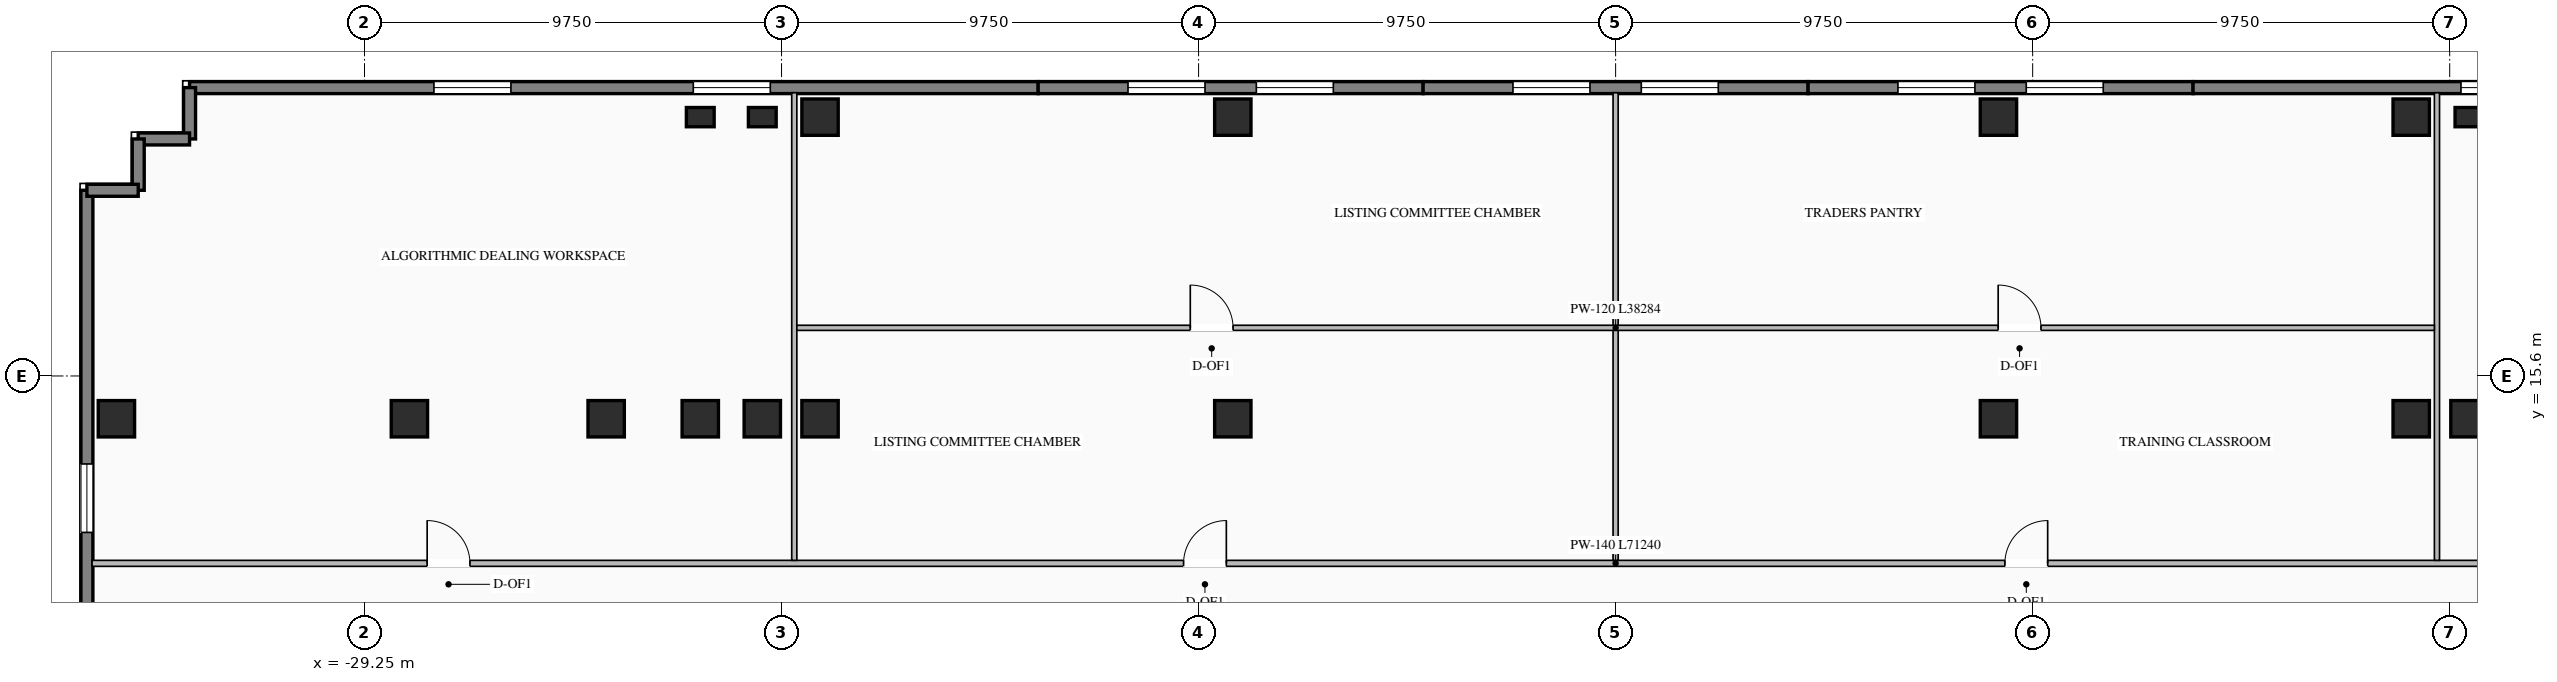
"""IFC4 building model, lengths in metres.
Left out: names, types, materials, properties, quantities, classifications, styles, units other than length and angle.
Written with IfcOpenShell. Run it as: python <this file> out.ifc"""

import sys

from ifc_helpers import new_model, si_unit, direction, frame, frame_2d, origin, origin_2d, place, context, subcontext, project, spatial, rectangle, i_section, extrude, element, fill, save


model = new_model("IFC4")
c1 = context("Model", 3, precision=1e-05, world=origin(), true_north=direction((0.0, 1.0)))
c2 = subcontext(c1, "Body", "Model", "MODEL_VIEW")
j1 = project(units=[si_unit("LENGTHUNIT", "METRE"), si_unit("PLANEANGLEUNIT", "RADIAN")], contexts=[c1])
p1 = place(None, origin())
s1 = spatial("IfcSite", under=j1, at=p1, CompositionType="ELEMENT")
p2 = place(p1, origin())
s2 = spatial("IfcBuilding", under=s1, at=p2, CompositionType="ELEMENT")
p3 = place(p2, frame((0.0, 0.0, 51.9)))
s3 = spatial("IfcBuildingStorey", under=s2, at=p3, CompositionType="ELEMENT", Elevation=51.9)
for number, where, z_axis, x_axis in (
    (1, (-21.4, 14.6, 0.0), (0.0, 0.0, 1.0), (1.0, 0.0, 0.0)),
    (2, (-19.95, 14.6, 0.0), (0.0, 0.0, 1.0), (1.0, 0.0, 0.0)),
    (3, (-18.6, 14.6, 0.0), (0.0, 0.0, 1.0), (1.0, 0.0, 0.0)),
    (4, (-8.95, 14.6, 0.0), (0.0, 0.0, 1.0), (1.0, 0.0, 0.0)),
    (5, (8.95, 14.6, 0.0), (0.0, 0.0, 1.0), (1.0, 0.0, 0.0)),
    (6, (18.6, 14.6, 0.0), (0.0, 0.0, 1.0), (1.0, 0.0, 0.0)),
    (7, (19.95, 14.6, 0.0), (0.0, 0.0, 1.0), (1.0, 0.0, 0.0)),
    (8, (-23.6, 14.6, 0.0), (0.0, 0.0, 1.0), (1.0, 0.0, 0.0)),
    (9, (-28.2, 14.6, 0.0), (0.0, 0.0, 1.0), (1.0, 0.0, 0.0)),
    (10, (-18.6, 21.65, 0.0), (0.0, 0.0, 1.0), (1.0, 0.0, 0.0)),
    (11, (-8.95, 21.65, 0.0), (0.0, 0.0, 1.0), (1.0, 0.0, 0.0)),
    (12, (8.95, 21.65, 0.0), (0.0, 0.0, 1.0), (1.0, 0.0, 0.0)),
    (13, (18.6, 21.65, 0.0), (0.0, 0.0, 1.0), (1.0, 0.0, 0.0)),
    (14, (-35.05, 14.6, 0.0), (0.0, 0.0, 1.0), (1.0, 0.0, 0.0)),
):
    element("IfcColumn", number, at=place(p3, frame(where, z_axis=z_axis, x_axis=x_axis)), inside=s3, PredefinedType="COLUMN", context=c2, shape_type="SweptSolid", body=[
        extrude(i_section(OverallWidth=0.85, OverallDepth=0.85, WebThickness=0.032, FlangeThickness=0.048, at=origin_2d()), origin(), (0.0, 0.0, 1.0), 3.45),
    ])
for number, where, z_axis, x_axis in (
    (15, (-21.4, 21.65, 0.0), (0.0, 0.0, 1.0), (1.0, 0.0, 0.0)),
    (16, (-19.95, 21.65, 0.0), (0.0, 0.0, 1.0), (1.0, 0.0, 0.0)),
    (17, (19.95, 21.65, 0.0), (0.0, 0.0, 1.0), (1.0, 0.0, 0.0)),
):
    element("IfcColumn", number, at=place(p3, frame(where, z_axis=z_axis, x_axis=x_axis)), inside=s3, PredefinedType="PILASTER", context=c2, shape_type="SweptSolid", body=[
        extrude(rectangle(XDim=0.65, YDim=0.45, at=origin_2d()), origin(), (0.0, 0.0, 1.0), 3.45),
    ])
p4 = place(p3, frame((-33.34, 22.34, 0.0), z_axis=(0.0, 0.0, 1.0), x_axis=(1.0, 0.0, 0.0)))
e18 = element("IfcWall", 18, at=p4, inside=s3, PredefinedType="STANDARD", context=c2, shape_type="SweptSolid", body=[
    extrude(rectangle(XDim=19.84, YDim=0.28, at=frame_2d((9.92, 0.0))), origin(), (0.0, 0.0, 1.0), 3.25),
])
p5 = place(p4, frame((5.713, 0.0, 0.76)))
e19 = element("IfcOpeningElement", 19, at=p5, cuts=e18, PredefinedType="OPENING", context=c2, shape_type="SweptSolid", body=[
    extrude(rectangle(XDim=1.8, YDim=1.95, at=frame_2d((0.9, 0.975))), frame((0.0, 0.15, 0.0), z_axis=(0.0, -1.0, 0.0), x_axis=(1.0, 0.0, 0.0)), (0.0, 0.0, 1.0), 0.3),
])
p6 = place(p4, frame((11.777, 0.0, 0.76)))
e20 = element("IfcOpeningElement", 20, at=p6, cuts=e18, PredefinedType="OPENING", context=c2, shape_type="SweptSolid", body=[
    extrude(rectangle(XDim=1.8, YDim=1.95, at=frame_2d((0.9, 0.975))), frame((0.0, 0.15, 0.0), z_axis=(0.0, -1.0, 0.0), x_axis=(1.0, 0.0, 0.0)), (0.0, 0.0, 1.0), 0.3),
])
p7 = place(p3, frame((-13.5, 22.34, 0.0), z_axis=(0.0, 0.0, 1.0), x_axis=(1.0, 0.0, 0.0)))
e21 = element("IfcWall", 21, at=p7, inside=s3, PredefinedType="STANDARD", context=c2, shape_type="SweptSolid", body=[
    extrude(rectangle(XDim=9.0, YDim=0.28, at=frame_2d((4.5, 0.0))), origin(), (0.0, 0.0, 1.0), 3.25),
])
p8 = place(p7, frame((2.1, 0.0, 0.76)))
e22 = element("IfcOpeningElement", 22, at=p8, cuts=e21, PredefinedType="OPENING", context=c2, shape_type="SweptSolid", body=[
    extrude(rectangle(XDim=1.8, YDim=1.95, at=frame_2d((0.9, 0.975))), frame((0.0, 0.15, 0.0), z_axis=(0.0, -1.0, 0.0), x_axis=(1.0, 0.0, 0.0)), (0.0, 0.0, 1.0), 0.3),
])
p9 = place(p7, frame((5.1, 0.0, 0.76)))
e23 = element("IfcOpeningElement", 23, at=p9, cuts=e21, PredefinedType="OPENING", context=c2, shape_type="SweptSolid", body=[
    extrude(rectangle(XDim=1.8, YDim=1.95, at=frame_2d((0.9, 0.975))), frame((0.0, 0.15, 0.0), z_axis=(0.0, -1.0, 0.0), x_axis=(1.0, 0.0, 0.0)), (0.0, 0.0, 1.0), 0.3),
])
p10 = place(p3, frame((-4.5, 22.34, 0.0), z_axis=(0.0, 0.0, 1.0), x_axis=(1.0, 0.0, 0.0)))
e24 = element("IfcWall", 24, at=p10, inside=s3, PredefinedType="STANDARD", context=c2, shape_type="SweptSolid", body=[
    extrude(rectangle(XDim=9.0, YDim=0.28, at=frame_2d((4.5, 0.0))), origin(), (0.0, 0.0, 1.0), 3.25),
])
p11 = place(p10, frame((2.1, 0.0, 0.76)))
e25 = element("IfcOpeningElement", 25, at=p11, cuts=e24, PredefinedType="OPENING", context=c2, shape_type="SweptSolid", body=[
    extrude(rectangle(XDim=1.8, YDim=1.95, at=frame_2d((0.9, 0.975))), frame((0.0, 0.15, 0.0), z_axis=(0.0, -1.0, 0.0), x_axis=(1.0, 0.0, 0.0)), (0.0, 0.0, 1.0), 0.3),
])
p12 = place(p10, frame((5.1, 0.0, 0.76)))
e26 = element("IfcOpeningElement", 26, at=p12, cuts=e24, PredefinedType="OPENING", context=c2, shape_type="SweptSolid", body=[
    extrude(rectangle(XDim=1.8, YDim=1.95, at=frame_2d((0.9, 0.975))), frame((0.0, 0.15, 0.0), z_axis=(0.0, -1.0, 0.0), x_axis=(1.0, 0.0, 0.0)), (0.0, 0.0, 1.0), 0.3),
])
p13 = place(p3, frame((4.5, 22.34, 0.0), z_axis=(0.0, 0.0, 1.0), x_axis=(1.0, 0.0, 0.0)))
e27 = element("IfcWall", 27, at=p13, inside=s3, PredefinedType="STANDARD", context=c2, shape_type="SweptSolid", body=[
    extrude(rectangle(XDim=9.0, YDim=0.28, at=frame_2d((4.5, 0.0))), origin(), (0.0, 0.0, 1.0), 3.25),
])
p14 = place(p13, frame((2.1, 0.0, 0.76)))
e28 = element("IfcOpeningElement", 28, at=p14, cuts=e27, PredefinedType="OPENING", context=c2, shape_type="SweptSolid", body=[
    extrude(rectangle(XDim=1.8, YDim=1.95, at=frame_2d((0.9, 0.975))), frame((0.0, 0.15, 0.0), z_axis=(0.0, -1.0, 0.0), x_axis=(1.0, 0.0, 0.0)), (0.0, 0.0, 1.0), 0.3),
])
p15 = place(p13, frame((5.1, 0.0, 0.76)))
e29 = element("IfcOpeningElement", 29, at=p15, cuts=e27, PredefinedType="OPENING", context=c2, shape_type="SweptSolid", body=[
    extrude(rectangle(XDim=1.8, YDim=1.95, at=frame_2d((0.9, 0.975))), frame((0.0, 0.15, 0.0), z_axis=(0.0, -1.0, 0.0), x_axis=(1.0, 0.0, 0.0)), (0.0, 0.0, 1.0), 0.3),
])
p16 = place(p3, frame((13.5, 22.34, 0.0), z_axis=(0.0, 0.0, 1.0), x_axis=(1.0, 0.0, 0.0)))
e30 = element("IfcWall", 30, at=p16, inside=s3, PredefinedType="STANDARD", context=c2, shape_type="SweptSolid", body=[
    extrude(rectangle(XDim=19.84, YDim=0.28, at=frame_2d((9.92, 0.0))), origin(), (0.0, 0.0, 1.0), 3.25),
])
p17 = place(p16, frame((6.263, 0.0, 0.76)))
e31 = element("IfcOpeningElement", 31, at=p17, cuts=e30, PredefinedType="OPENING", context=c2, shape_type="SweptSolid", body=[
    extrude(rectangle(XDim=1.8, YDim=1.95, at=frame_2d((0.9, 0.975))), frame((0.0, 0.15, 0.0), z_axis=(0.0, -1.0, 0.0), x_axis=(1.0, 0.0, 0.0)), (0.0, 0.0, 1.0), 0.3),
])
p18 = place(p16, frame((12.327, 0.0, 0.76)))
e32 = element("IfcOpeningElement", 32, at=p18, cuts=e30, PredefinedType="OPENING", context=c2, shape_type="SweptSolid", body=[
    extrude(rectangle(XDim=1.8, YDim=1.95, at=frame_2d((0.9, 0.975))), frame((0.0, 0.15, 0.0), z_axis=(0.0, -1.0, 0.0), x_axis=(1.0, 0.0, 0.0)), (0.0, 0.0, 1.0), 0.3),
])
p19 = place(p3, frame((-35.74, 0.0, 0.0), z_axis=(0.0, 0.0, 1.0), x_axis=(0.0, 1.0, 0.0)))
e33 = element("IfcWall", 33, at=p19, inside=s3, PredefinedType="STANDARD", context=c2, shape_type="SweptSolid", body=[
    extrude(rectangle(XDim=19.94, YDim=0.28, at=frame_2d((9.97, 0.0))), origin(), (0.0, 0.0, 1.0), 3.25),
])
p20 = place(p19, frame((5.847, 0.0, 0.76)))
e34 = element("IfcOpeningElement", 34, at=p20, cuts=e33, PredefinedType="OPENING", context=c2, shape_type="SweptSolid", body=[
    extrude(rectangle(XDim=1.6, YDim=1.95, at=frame_2d((0.8, 0.975))), frame((0.0, 0.15, 0.0), z_axis=(0.0, -1.0, 0.0), x_axis=(1.0, 0.0, 0.0)), (0.0, 0.0, 1.0), 0.3),
])
p21 = place(p19, frame((11.943, 0.0, 0.76)))
e35 = element("IfcOpeningElement", 35, at=p21, cuts=e33, PredefinedType="OPENING", context=c2, shape_type="SweptSolid", body=[
    extrude(rectangle(XDim=1.6, YDim=1.95, at=frame_2d((0.8, 0.975))), frame((0.0, 0.15, 0.0), z_axis=(0.0, -1.0, 0.0), x_axis=(1.0, 0.0, 0.0)), (0.0, 0.0, 1.0), 0.3),
])
p22 = place(p3, frame((-33.34, 22.34, 0.0), z_axis=(0.0, 0.0, 1.0), x_axis=(0.0, -1.0, 0.0)))
e36 = element("IfcWall", 36, at=p22, inside=s3, PredefinedType="STANDARD", context=c2, shape_type="SweptSolid", body=[
    extrude(rectangle(XDim=1.2, YDim=0.28, at=frame_2d((0.6, 0.0))), origin(), (0.0, 0.0, 1.0), 3.25),
])
for number, where, z_axis, x_axis in (
    (37, (-33.34, 21.14, 0.0), (0.0, 0.0, 1.0), (-1.0, 0.0, 0.0)),
    (38, (-34.54, 21.14, 0.0), (0.0, 0.0, 1.0), (0.0, -1.0, 0.0)),
    (39, (-34.54, 19.94, 0.0), (0.0, 0.0, 1.0), (-1.0, 0.0, 0.0)),
):
    element("IfcWall", number, at=place(p3, frame(where, z_axis=z_axis, x_axis=x_axis)), inside=s3, PredefinedType="STANDARD", context=c2, shape_type="SweptSolid", body=[
        extrude(rectangle(XDim=1.2, YDim=0.28, at=frame_2d((0.6, 0.0))), origin(), (0.0, 0.0, 1.0), 3.25),
    ])
p23 = place(p3, frame((-35.62, 11.22, 0.0), z_axis=(0.0, 0.0, 1.0), x_axis=(1.0, 0.0, 0.0)))
e40 = element("IfcWall", 40, at=p23, inside=s3, PredefinedType="STANDARD", context=c2, shape_type="SweptSolid", body=[
    extrude(rectangle(XDim=71.24, YDim=0.14, at=frame_2d((35.62, 0.0))), origin(), (0.0, 0.0, 1.0), 3.25),
])
p24 = place(p23, frame((7.835, 0.0, 0.0)))
e41 = element("IfcOpeningElement", 41, at=p24, cuts=e40, PredefinedType="OPENING", context=c2, shape_type="SweptSolid", body=[
    extrude(rectangle(XDim=1.0, YDim=2.08, at=frame_2d((0.5, 1.04))), frame((0.0, 0.08, 0.0), z_axis=(0.0, -1.0, 0.0), x_axis=(1.0, 0.0, 0.0)), (0.0, 0.0, 1.0), 0.16),
])
p25 = place(p23, frame((25.519, 0.0, 0.0)))
e42 = element("IfcOpeningElement", 42, at=p25, cuts=e40, PredefinedType="OPENING", context=c2, shape_type="SweptSolid", body=[
    extrude(rectangle(XDim=1.0, YDim=2.08, at=frame_2d((0.5, 1.04))), frame((0.0, 0.08, 0.0), z_axis=(0.0, -1.0, 0.0), x_axis=(1.0, 0.0, 0.0)), (0.0, 0.0, 1.0), 0.16),
])
p26 = place(p23, frame((44.721, 0.0, 0.0)))
e43 = element("IfcOpeningElement", 43, at=p26, cuts=e40, PredefinedType="OPENING", context=c2, shape_type="SweptSolid", body=[
    extrude(rectangle(XDim=1.0, YDim=2.08, at=frame_2d((0.5, 1.04))), frame((0.0, 0.08, 0.0), z_axis=(0.0, -1.0, 0.0), x_axis=(1.0, 0.0, 0.0)), (0.0, 0.0, 1.0), 0.16),
])
p27 = place(p23, frame((62.405, 0.0, 0.0)))
e44 = element("IfcOpeningElement", 44, at=p27, cuts=e40, PredefinedType="OPENING", context=c2, shape_type="SweptSolid", body=[
    extrude(rectangle(XDim=1.0, YDim=2.08, at=frame_2d((0.5, 1.04))), frame((0.0, 0.08, 0.0), z_axis=(0.0, -1.0, 0.0), x_axis=(1.0, 0.0, 0.0)), (0.0, 0.0, 1.0), 0.16),
])
for number, where, z_axis, x_axis in (
    (45, (-19.202, 11.29, 0.0), (0.0, 0.0, 1.0), (0.0, 1.0, 0.0)),
    (46, (0.0, 11.29, 0.0), (0.0, 0.0, 1.0), (0.0, 1.0, 0.0)),
    (47, (19.202, 11.29, 0.0), (0.0, 0.0, 1.0), (0.0, 1.0, 0.0)),
):
    element("IfcWall", number, at=place(p3, frame(where, z_axis=z_axis, x_axis=x_axis)), inside=s3, PredefinedType="STANDARD", context=c2, shape_type="SweptSolid", body=[
        extrude(rectangle(XDim=10.93, YDim=0.12, at=frame_2d((5.465, 0.0))), origin(), (0.0, 0.0, 1.0), 3.25),
    ])
p28 = place(p3, frame((-19.142, 16.725, 0.0), z_axis=(0.0, 0.0, 1.0), x_axis=(1.0, 0.0, 0.0)))
e48 = element("IfcWall", 48, at=p28, inside=s3, PredefinedType="STANDARD", context=c2, shape_type="SweptSolid", body=[
    extrude(rectangle(XDim=38.284, YDim=0.12, at=frame_2d((19.142, 0.0))), origin(), (0.0, 0.0, 1.0), 3.25),
])
p29 = place(p28, frame((9.198, 0.0, 0.0)))
e49 = element("IfcOpeningElement", 49, at=p29, cuts=e48, PredefinedType="OPENING", context=c2, shape_type="SweptSolid", body=[
    extrude(rectangle(XDim=1.0, YDim=2.08, at=frame_2d((0.5, 1.04))), frame((0.0, 0.07, 0.0), z_axis=(0.0, -1.0, 0.0), x_axis=(1.0, 0.0, 0.0)), (0.0, 0.0, 1.0), 0.14),
])
p30 = place(p28, frame((28.086, 0.0, 0.0)))
e50 = element("IfcOpeningElement", 50, at=p30, cuts=e48, PredefinedType="OPENING", context=c2, shape_type="SweptSolid", body=[
    extrude(rectangle(XDim=1.0, YDim=2.08, at=frame_2d((0.5, 1.04))), frame((0.0, 0.07, 0.0), z_axis=(0.0, -1.0, 0.0), x_axis=(1.0, 0.0, 0.0)), (0.0, 0.0, 1.0), 0.14),
])
p31 = place(p5, origin())
e51 = element("IfcWindow", 51, at=p31, inside=s3, PartitioningType="SINGLE_PANEL", PredefinedType="WINDOW", context=c2, shape_type="SweptSolid", body=[
    extrude(rectangle(XDim=1.8, YDim=1.95, at=frame_2d((0.9, 0.975))), frame((0.0, 0.03, 0.0), z_axis=(0.0, -1.0, 0.0), x_axis=(1.0, 0.0, 0.0)), (0.0, 0.0, 1.0), 0.06),
])
fill(e19, e51)
p32 = place(p6, origin())
e52 = element("IfcWindow", 52, at=p32, inside=s3, PartitioningType="SINGLE_PANEL", PredefinedType="WINDOW", context=c2, shape_type="SweptSolid", body=[
    extrude(rectangle(XDim=1.8, YDim=1.95, at=frame_2d((0.9, 0.975))), frame((0.0, 0.03, 0.0), z_axis=(0.0, -1.0, 0.0), x_axis=(1.0, 0.0, 0.0)), (0.0, 0.0, 1.0), 0.06),
])
fill(e20, e52)
p33 = place(p8, origin())
e53 = element("IfcWindow", 53, at=p33, inside=s3, PartitioningType="SINGLE_PANEL", PredefinedType="WINDOW", context=c2, shape_type="SweptSolid", body=[
    extrude(rectangle(XDim=1.8, YDim=1.95, at=frame_2d((0.9, 0.975))), frame((0.0, 0.03, 0.0), z_axis=(0.0, -1.0, 0.0), x_axis=(1.0, 0.0, 0.0)), (0.0, 0.0, 1.0), 0.06),
])
fill(e22, e53)
p34 = place(p9, origin())
e54 = element("IfcWindow", 54, at=p34, inside=s3, PartitioningType="SINGLE_PANEL", PredefinedType="WINDOW", context=c2, shape_type="SweptSolid", body=[
    extrude(rectangle(XDim=1.8, YDim=1.95, at=frame_2d((0.9, 0.975))), frame((0.0, 0.03, 0.0), z_axis=(0.0, -1.0, 0.0), x_axis=(1.0, 0.0, 0.0)), (0.0, 0.0, 1.0), 0.06),
])
fill(e23, e54)
p35 = place(p11, origin())
e55 = element("IfcWindow", 55, at=p35, inside=s3, PartitioningType="SINGLE_PANEL", PredefinedType="WINDOW", context=c2, shape_type="SweptSolid", body=[
    extrude(rectangle(XDim=1.8, YDim=1.95, at=frame_2d((0.9, 0.975))), frame((0.0, 0.03, 0.0), z_axis=(0.0, -1.0, 0.0), x_axis=(1.0, 0.0, 0.0)), (0.0, 0.0, 1.0), 0.06),
])
fill(e25, e55)
p36 = place(p12, origin())
e56 = element("IfcWindow", 56, at=p36, inside=s3, PartitioningType="SINGLE_PANEL", PredefinedType="WINDOW", context=c2, shape_type="SweptSolid", body=[
    extrude(rectangle(XDim=1.8, YDim=1.95, at=frame_2d((0.9, 0.975))), frame((0.0, 0.03, 0.0), z_axis=(0.0, -1.0, 0.0), x_axis=(1.0, 0.0, 0.0)), (0.0, 0.0, 1.0), 0.06),
])
fill(e26, e56)
p37 = place(p14, origin())
e57 = element("IfcWindow", 57, at=p37, inside=s3, PartitioningType="SINGLE_PANEL", PredefinedType="WINDOW", context=c2, shape_type="SweptSolid", body=[
    extrude(rectangle(XDim=1.8, YDim=1.95, at=frame_2d((0.9, 0.975))), frame((0.0, 0.03, 0.0), z_axis=(0.0, -1.0, 0.0), x_axis=(1.0, 0.0, 0.0)), (0.0, 0.0, 1.0), 0.06),
])
fill(e28, e57)
p38 = place(p15, origin())
e58 = element("IfcWindow", 58, at=p38, inside=s3, PartitioningType="SINGLE_PANEL", PredefinedType="WINDOW", context=c2, shape_type="SweptSolid", body=[
    extrude(rectangle(XDim=1.8, YDim=1.95, at=frame_2d((0.9, 0.975))), frame((0.0, 0.03, 0.0), z_axis=(0.0, -1.0, 0.0), x_axis=(1.0, 0.0, 0.0)), (0.0, 0.0, 1.0), 0.06),
])
fill(e29, e58)
p39 = place(p17, origin())
e59 = element("IfcWindow", 59, at=p39, inside=s3, PartitioningType="SINGLE_PANEL", PredefinedType="WINDOW", context=c2, shape_type="SweptSolid", body=[
    extrude(rectangle(XDim=1.8, YDim=1.95, at=frame_2d((0.9, 0.975))), frame((0.0, 0.03, 0.0), z_axis=(0.0, -1.0, 0.0), x_axis=(1.0, 0.0, 0.0)), (0.0, 0.0, 1.0), 0.06),
])
fill(e31, e59)
p40 = place(p21, origin())
e60 = element("IfcWindow", 60, at=p40, inside=s3, PartitioningType="SINGLE_PANEL", PredefinedType="WINDOW", context=c2, shape_type="SweptSolid", body=[
    extrude(rectangle(XDim=1.6, YDim=1.95, at=frame_2d((0.8, 0.975))), frame((0.0, 0.03, 0.0), z_axis=(0.0, -1.0, 0.0), x_axis=(1.0, 0.0, 0.0)), (0.0, 0.0, 1.0), 0.06),
])
fill(e35, e60)
p41 = place(p24, origin())
e61 = element("IfcDoor", 61, at=p41, inside=s3, OperationType="SINGLE_SWING_LEFT", PredefinedType="DOOR", context=c2, shape_type="SweptSolid", body=[
    extrude(rectangle(XDim=1.0, YDim=2.08, at=frame_2d((0.5, 1.04))), frame((0.0, 0.025, 0.0), z_axis=(0.0, -1.0, 0.0), x_axis=(1.0, 0.0, 0.0)), (0.0, 0.0, 1.0), 0.05),
])
fill(e41, e61)
p42 = place(p25, origin())
e62 = element("IfcDoor", 62, at=p42, inside=s3, OperationType="SINGLE_SWING_RIGHT", PredefinedType="DOOR", context=c2, shape_type="SweptSolid", body=[
    extrude(rectangle(XDim=1.0, YDim=2.08, at=frame_2d((0.5, 1.04))), frame((0.0, 0.025, 0.0), z_axis=(0.0, -1.0, 0.0), x_axis=(1.0, 0.0, 0.0)), (0.0, 0.0, 1.0), 0.05),
])
fill(e42, e62)
p43 = place(p29, origin())
e63 = element("IfcDoor", 63, at=p43, inside=s3, OperationType="SINGLE_SWING_LEFT", PredefinedType="DOOR", context=c2, shape_type="SweptSolid", body=[
    extrude(rectangle(XDim=1.0, YDim=2.08, at=frame_2d((0.5, 1.04))), frame((0.0, 0.025, 0.0), z_axis=(0.0, -1.0, 0.0), x_axis=(1.0, 0.0, 0.0)), (0.0, 0.0, 1.0), 0.05),
])
fill(e49, e63)
p44 = place(p26, origin())
e64 = element("IfcDoor", 64, at=p44, inside=s3, OperationType="SINGLE_SWING_RIGHT", PredefinedType="DOOR", context=c2, shape_type="SweptSolid", body=[
    extrude(rectangle(XDim=1.0, YDim=2.08, at=frame_2d((0.5, 1.04))), frame((0.0, 0.025, 0.0), z_axis=(0.0, -1.0, 0.0), x_axis=(1.0, 0.0, 0.0)), (0.0, 0.0, 1.0), 0.05),
])
fill(e43, e64)
p45 = place(p30, origin())
e65 = element("IfcDoor", 65, at=p45, inside=s3, OperationType="SINGLE_SWING_LEFT", PredefinedType="DOOR", context=c2, shape_type="SweptSolid", body=[
    extrude(rectangle(XDim=1.0, YDim=2.08, at=frame_2d((0.5, 1.04))), frame((0.0, 0.025, 0.0), z_axis=(0.0, -1.0, 0.0), x_axis=(1.0, 0.0, 0.0)), (0.0, 0.0, 1.0), 0.05),
])
fill(e50, e65)
save(model, sys.argv[1])
